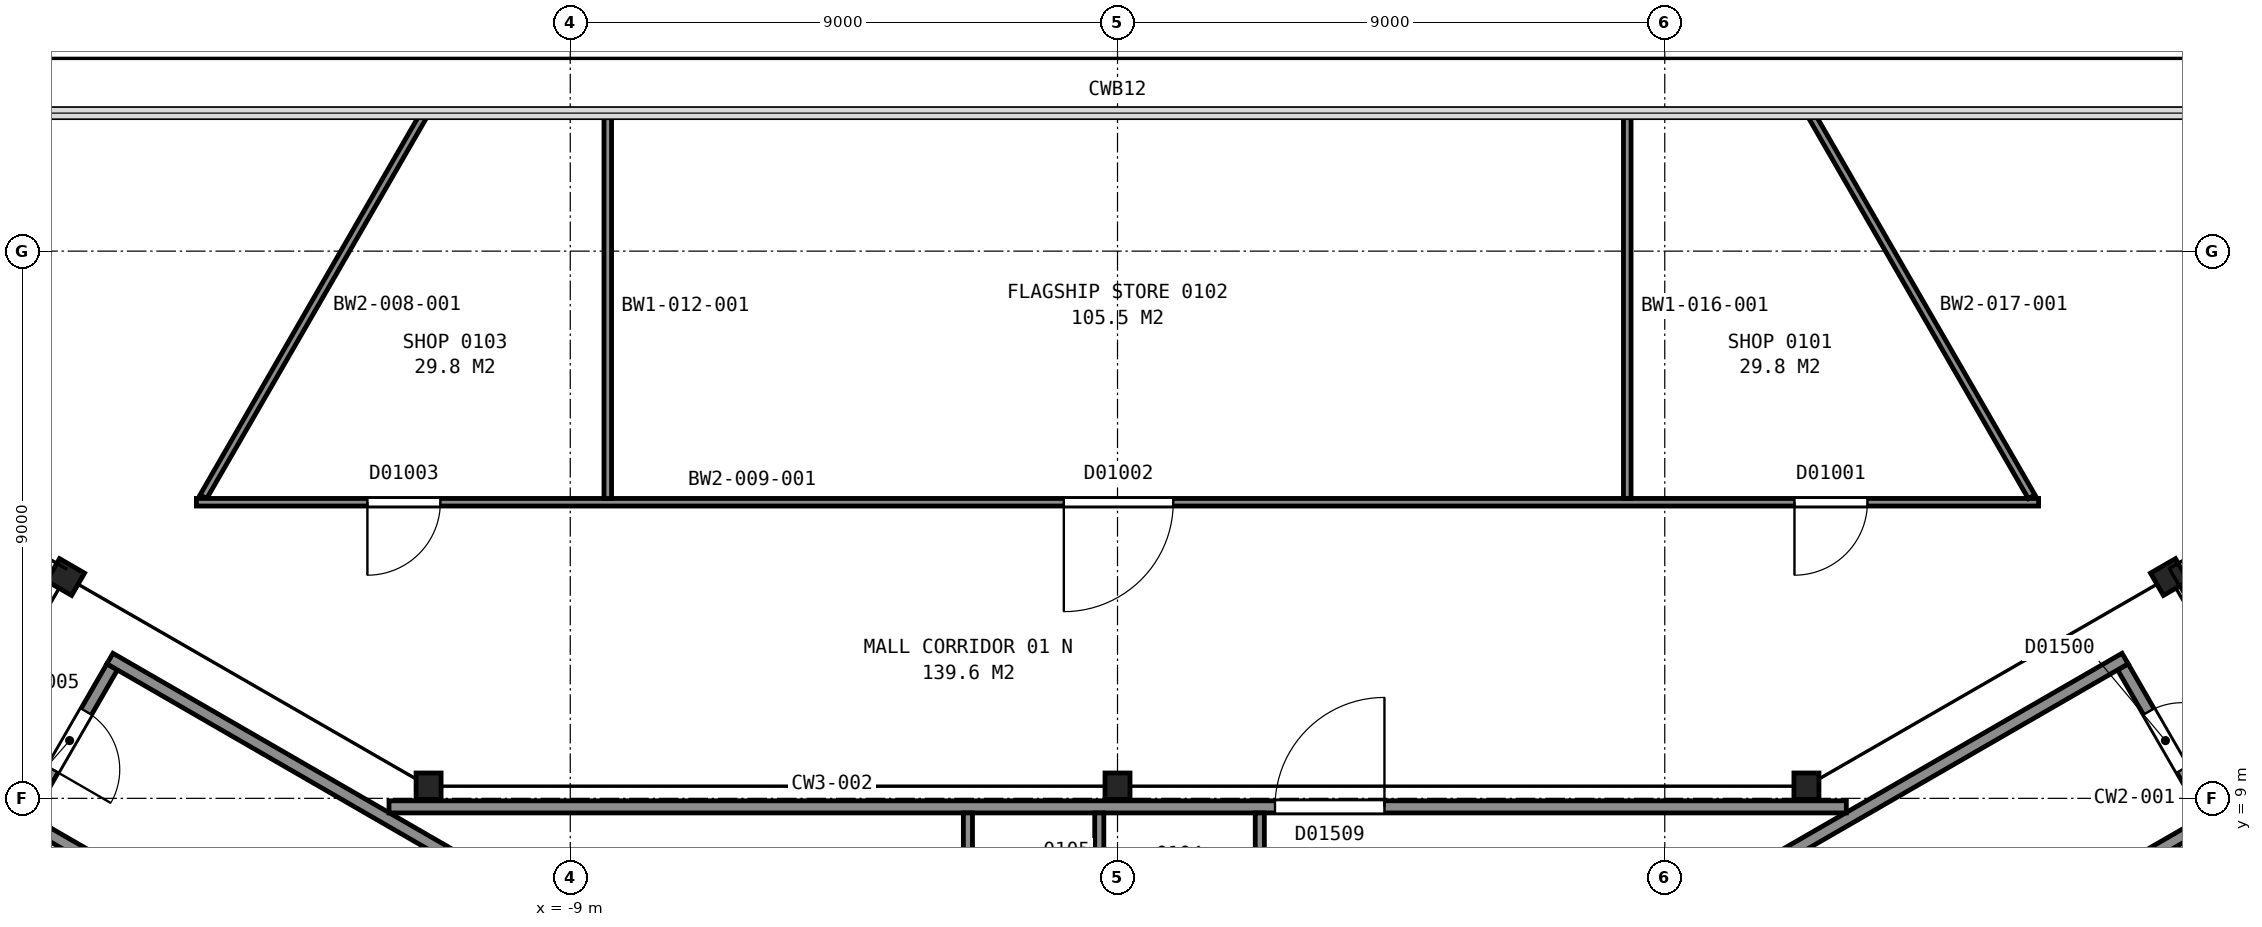
"""IFC4 building model, lengths in metres.
Left out: names, types, materials, properties, quantities, classifications, styles, units other than length and angle.
Written with IfcOpenShell. Run it as: python <this file> out.ifc"""

import sys

from ifc_helpers import new_model, si_unit, direction, frame, frame_2d, origin, origin_2d, place, context, subcontext, project, spatial, rectangle, i_section, extrude, element, fill, save


model = new_model("IFC4")
c1 = context("Model", 3, precision=1e-05, world=origin(), true_north=direction((0.0, 1.0)))
c2 = subcontext(c1, "Body", "Model", "MODEL_VIEW")
j1 = project(units=[si_unit("LENGTHUNIT", "METRE"), si_unit("PLANEANGLEUNIT", "RADIAN")], contexts=[c1])
p1 = place(None, origin())
s1 = spatial("IfcSite", under=j1, at=p1, CompositionType="ELEMENT")
p2 = place(p1, origin())
s2 = spatial("IfcBuilding", under=s1, at=p2, CompositionType="ELEMENT")
p3 = place(p2, frame((0.0, 0.0, 12.0)))
s3 = spatial("IfcBuildingStorey", under=s2, at=p3, CompositionType="ELEMENT", Elevation=12.0)
p4 = place(p3, frame((17.3, 12.64, 0.0), z_axis=(0.0, 0.0, 1.0), x_axis=(0.5, -0.866025403784, 0.0)))
e1 = element("IfcColumn", 1, at=p4, inside=s3, PredefinedType="COLUMN", context=c2, shape_type="SweptSolid", body=[
    extrude(i_section(OverallWidth=0.424, OverallDepth=0.475, WebThickness=0.048, FlangeThickness=0.077, FilletRadius=0.015, at=origin_2d()), origin(), (0.0, 0.0, 1.0), 5.4),
])
for number, where, z_axis, x_axis in (
    (2, (11.33, 9.2, 0.0), (0.0, 0.0, 1.0), (1.0, 0.0, 0.0)),
    (3, (0.0, 9.2, 0.0), (0.0, 0.0, 1.0), (1.0, 0.0, 0.0)),
    (4, (-11.33, 9.2, 0.0), (0.0, 0.0, 1.0), (1.0, 0.0, 0.0)),
):
    element("IfcColumn", number, at=place(p3, frame(where, z_axis=z_axis, x_axis=x_axis)), inside=s3, PredefinedType="COLUMN", context=c2, shape_type="SweptSolid", body=[
        extrude(i_section(OverallWidth=0.411, OverallDepth=0.434, WebThickness=0.036, FlangeThickness=0.057, FilletRadius=0.015, at=origin_2d()), origin(), (0.0, 0.0, 1.0), 5.4),
    ])
p5 = place(p3, frame((-17.3, 12.64, 0.0), z_axis=(0.0, 0.0, 1.0), x_axis=(0.5, 0.866025403784, 0.0)))
e5 = element("IfcColumn", 5, at=p5, inside=s3, PredefinedType="COLUMN", context=c2, shape_type="SweptSolid", body=[
    extrude(i_section(OverallWidth=0.424, OverallDepth=0.475, WebThickness=0.048, FlangeThickness=0.077, FilletRadius=0.015, at=origin_2d()), origin(), (0.0, 0.0, 1.0), 5.4),
])
p6 = place(p3, frame((17.934, 8.738, 0.0), z_axis=(0.0, 0.0, 1.0), x_axis=(-0.49998411664, 0.866034573852, 0.0)))
e6 = element("IfcWall", 6, at=p6, inside=s3, PredefinedType="PARTITIONING", context=c2, shape_type="SweptSolid", body=[
    extrude(rectangle(XDim=2.8, YDim=0.2, at=frame_2d((1.4, 0.0))), origin(), (0.0, 0.0, 1.0), 5.15),
])
p7 = place(p6, frame((0.85, 0.0, 0.0)))
e7 = element("IfcOpeningElement", 7, at=p7, cuts=e6, PredefinedType="OPENING", context=c2, shape_type="SweptSolid", body=[
    extrude(rectangle(XDim=1.1, YDim=2.1, at=frame_2d((0.55, 1.05))), frame((0.0, 0.11, 0.0), z_axis=(0.0, -1.0, 0.0), x_axis=(1.0, 0.0, 0.0)), (0.0, 0.0, 1.0), 0.22),
])
for number, where, z_axis, x_axis in (
    (8, (6.178, 5.299, 0.0), (0.0, 0.0, 1.0), (0.866, 0.5, 0.0)),
    (9, (7.678, 2.701, 0.0), (0.0, 0.0, 1.0), (0.866, 0.5, 0.0)),
):
    element("IfcWall", number, at=place(p3, frame(where, z_axis=z_axis, x_axis=x_axis)), inside=s3, PredefinedType="PARTITIONING", context=c2, shape_type="SweptSolid", body=[
        extrude(rectangle(XDim=12.0, YDim=0.2, at=frame_2d((6.0, 0.0))), origin(), (0.0, 0.0, 1.0), 5.15),
    ])
p8 = place(p3, frame((-16.534, 11.162, 0.0), z_axis=(0.0, 0.0, 1.0), x_axis=(-0.49998411664, -0.866034573852, 0.0)))
e10 = element("IfcWall", 10, at=p8, inside=s3, PredefinedType="PARTITIONING", context=c2, shape_type="SweptSolid", body=[
    extrude(rectangle(XDim=2.8, YDim=0.2, at=frame_2d((1.4, 0.0))), origin(), (0.0, 0.0, 1.0), 5.15),
])
p9 = place(p8, frame((0.85, 0.0, 0.0)))
e11 = element("IfcOpeningElement", 11, at=p9, cuts=e10, PredefinedType="OPENING", context=c2, shape_type="SweptSolid", body=[
    extrude(rectangle(XDim=1.1, YDim=2.1, at=frame_2d((0.55, 1.05))), frame((0.0, 0.11, 0.0), z_axis=(0.0, -1.0, 0.0), x_axis=(1.0, 0.0, 0.0)), (0.0, 0.0, 1.0), 0.22),
])
for number, where, z_axis, x_axis in (
    (12, (-7.678, 2.701, 0.0), (0.0, 0.0, 1.0), (-0.866, 0.5, 0.0)),
    (13, (-6.178, 5.299, 0.0), (0.0, 0.0, 1.0), (-0.866, 0.5, 0.0)),
):
    element("IfcWall", number, at=place(p3, frame(where, z_axis=z_axis, x_axis=x_axis)), inside=s3, PredefinedType="PARTITIONING", context=c2, shape_type="SweptSolid", body=[
        extrude(rectangle(XDim=12.0, YDim=0.2, at=frame_2d((6.0, 0.0))), origin(), (0.0, 0.0, 1.0), 5.15),
    ])
p10 = place(p3, frame((11.986, 8.86, 0.0), z_axis=(0.0, 0.0, 1.0), x_axis=(-1.0, 0.0, 0.0)))
e14 = element("IfcWall", 14, at=p10, inside=s3, PredefinedType="PARTITIONING", context=c2, shape_type="SweptSolid", body=[
    extrude(rectangle(XDim=23.967, YDim=0.2, at=frame_2d((11.983, 0.0))), origin(), (0.0, 0.0, 1.0), 5.15),
])
p11 = place(p10, frame((7.596, 0.0, 0.0)))
e15 = element("IfcOpeningElement", 15, at=p11, cuts=e14, PredefinedType="OPENING", context=c2, shape_type="SweptSolid", body=[
    extrude(rectangle(XDim=1.8, YDim=2.1, at=frame_2d((0.9, 1.05))), frame((0.0, 0.11, 0.0), z_axis=(0.0, -1.0, 0.0), x_axis=(1.0, 0.0, 0.0)), (0.0, 0.0, 1.0), 0.22),
])
p12 = place(p3, frame((-2.46, 8.76, 0.0), z_axis=(0.0, 0.0, 1.0), x_axis=(0.0, -1.0, 0.0)))
e16 = element("IfcWall", 16, at=p12, inside=s3, PredefinedType="PARTITIONING", context=c2, shape_type="SweptSolid", body=[
    extrude(rectangle(XDim=2.125, YDim=0.15, at=frame_2d((1.062, 0.0))), origin(), (0.0, 0.0, 1.0), 5.15),
])
p13 = place(p12, frame((0.6, 0.0, 0.0)))
e17 = element("IfcOpeningElement", 17, at=p13, cuts=e16, PredefinedType="OPENING", context=c2, shape_type="SweptSolid", body=[
    extrude(rectangle(XDim=0.9, YDim=2.1, at=frame_2d((0.45, 1.05))), frame((0.0, 0.085, 0.0), z_axis=(0.0, -1.0, 0.0), x_axis=(1.0, 0.0, 0.0)), (0.0, 0.0, 1.0), 0.17),
])
for number, where, z_axis, x_axis in (
    (18, (-0.3, 6.635, 0.0), (0.0, 0.0, 1.0), (0.0, 1.0, 0.0)),
    (19, (2.34, 6.635, 0.0), (0.0, 0.0, 1.0), (0.0, 1.0, 0.0)),
):
    element("IfcWall", number, at=place(p3, frame(where, z_axis=z_axis, x_axis=x_axis)), inside=s3, PredefinedType="PARTITIONING", context=c2, shape_type="SweptSolid", body=[
        extrude(rectangle(XDim=2.125, YDim=0.15, at=frame_2d((1.062, 0.0))), origin(), (0.0, 0.0, 1.0), 5.15),
    ])
p14 = place(p3, frame((-15.033, 13.961, 0.0), z_axis=(0.0, 0.0, 1.0), x_axis=(0.499977739203, 0.86603825568, 0.0)))
e20 = element("IfcWall", 20, at=p14, inside=s3, PredefinedType="PARTITIONING", context=c2, shape_type="SweptSolid", body=[
    extrude(rectangle(XDim=7.285, YDim=0.125, at=frame_2d((3.643, 0.0))), origin(), (0.0, 0.0, 1.0), 5.24),
])
p15 = place(p3, frame((-15.148, 13.87, 0.0), z_axis=(0.0, 0.0, 1.0), x_axis=(1.0, 0.0, 0.0)))
e21 = element("IfcWall", 21, at=p15, inside=s3, PredefinedType="PARTITIONING", context=c2, shape_type="SweptSolid", body=[
    extrude(rectangle(XDim=30.297, YDim=0.125, at=frame_2d((15.148, 0.0))), origin(), (0.0, 0.0, 1.0), 4.253),
])
p16 = place(p15, frame((26.281, 0.0, 0.0)))
e22 = element("IfcOpeningElement", 22, at=p16, cuts=e21, PredefinedType="OPENING", context=c2, shape_type="SweptSolid", body=[
    extrude(rectangle(XDim=1.2, YDim=2.1, at=frame_2d((0.6, 1.05))), frame((0.0, 0.073, 0.0), z_axis=(0.0, -1.0, 0.0), x_axis=(1.0, 0.0, 0.0)), (0.0, 0.0, 1.0), 0.145),
])
p17 = place(p15, frame((14.265, 0.0, 0.0)))
e23 = element("IfcOpeningElement", 23, at=p17, cuts=e21, PredefinedType="OPENING", context=c2, shape_type="SweptSolid", body=[
    extrude(rectangle(XDim=1.8, YDim=2.4, at=frame_2d((0.9, 1.2))), frame((0.0, 0.073, 0.0), z_axis=(0.0, -1.0, 0.0), x_axis=(1.0, 0.0, 0.0)), (0.0, 0.0, 1.0), 0.145),
])
p18 = place(p15, frame((2.812, 0.0, 0.0)))
e24 = element("IfcOpeningElement", 24, at=p18, cuts=e21, PredefinedType="OPENING", context=c2, shape_type="SweptSolid", body=[
    extrude(rectangle(XDim=1.2, YDim=2.1, at=frame_2d((0.6, 1.05))), frame((0.0, 0.073, 0.0), z_axis=(0.0, -1.0, 0.0), x_axis=(1.0, 0.0, 0.0)), (0.0, 0.0, 1.0), 0.145),
])
for number, where, z_axis, x_axis in (
    (25, (-8.383, 13.933, 0.0), (0.0, 0.0, 1.0), (0.0, 1.0, 0.0)),
    (26, (8.383, 13.933, 0.0), (0.0, 0.0, 1.0), (0.0, 1.0, 0.0)),
):
    element("IfcWall", number, at=place(p3, frame(where, z_axis=z_axis, x_axis=x_axis)), inside=s3, PredefinedType="PARTITIONING", context=c2, shape_type="SweptSolid", body=[
        extrude(rectangle(XDim=6.337, YDim=0.125, at=frame_2d((3.169, 0.0))), origin(), (0.0, 0.0, 1.0), 4.253),
    ])
p19 = place(p3, frame((11.391, 20.27, 0.0), z_axis=(0.0, 0.0, 1.0), x_axis=(0.499977739203, -0.86603825568, 0.0)))
e27 = element("IfcWall", 27, at=p19, inside=s3, PredefinedType="PARTITIONING", context=c2, shape_type="SweptSolid", body=[
    extrude(rectangle(XDim=7.285, YDim=0.125, at=frame_2d((3.643, 0.0))), origin(), (0.0, 0.0, 1.0), 5.24),
])
p20 = place(p7, origin())
e28 = element("IfcDoor", 28, at=p20, inside=s3, OperationType="SINGLE_SWING_LEFT", PredefinedType="DOOR", context=c2, shape_type="SweptSolid", body=[
    extrude(rectangle(XDim=1.1, YDim=2.1, at=frame_2d((0.55, 1.05))), frame((0.0, 0.025, 0.0), z_axis=(0.0, -1.0, 0.0), x_axis=(1.0, 0.0, 0.0)), (0.0, 0.0, 1.0), 0.05),
])
fill(e7, e28)
p21 = place(p9, origin())
e29 = element("IfcDoor", 29, at=p21, inside=s3, OperationType="SINGLE_SWING_RIGHT", PredefinedType="DOOR", context=c2, shape_type="SweptSolid", body=[
    extrude(rectangle(XDim=1.1, YDim=2.1, at=frame_2d((0.55, 1.05))), frame((0.0, 0.025, 0.0), z_axis=(0.0, -1.0, 0.0), x_axis=(1.0, 0.0, 0.0)), (0.0, 0.0, 1.0), 0.05),
])
fill(e11, e29)
p22 = place(p11, origin())
e30 = element("IfcDoor", 30, at=p22, inside=s3, OperationType="DOUBLE_DOOR_SINGLE_SWING", PredefinedType="DOOR", context=c2, shape_type="SweptSolid", body=[
    extrude(rectangle(XDim=1.8, YDim=2.1, at=frame_2d((0.9, 1.05))), frame((0.0, 0.025, 0.0), z_axis=(0.0, -1.0, 0.0), x_axis=(1.0, 0.0, 0.0)), (0.0, 0.0, 1.0), 0.05),
])
fill(e15, e30)
p23 = place(p16, origin())
e31 = element("IfcDoor", 31, at=p23, inside=s3, OperationType="SINGLE_SWING_LEFT", PredefinedType="DOOR", context=c2, shape_type="SweptSolid", body=[
    extrude(rectangle(XDim=1.2, YDim=2.1, at=frame_2d((0.6, 1.05))), frame((0.0, 0.025, 0.0), z_axis=(0.0, -1.0, 0.0), x_axis=(1.0, 0.0, 0.0)), (0.0, 0.0, 1.0), 0.05),
])
fill(e22, e31)
p24 = place(p17, origin())
e32 = element("IfcDoor", 32, at=p24, inside=s3, OperationType="DOUBLE_DOOR_SINGLE_SWING", PredefinedType="DOOR", context=c2, shape_type="SweptSolid", body=[
    extrude(rectangle(XDim=1.8, YDim=2.4, at=frame_2d((0.9, 1.2))), frame((0.0, 0.025, 0.0), z_axis=(0.0, -1.0, 0.0), x_axis=(1.0, 0.0, 0.0)), (0.0, 0.0, 1.0), 0.05),
])
fill(e23, e32)
p25 = place(p18, origin())
e33 = element("IfcDoor", 33, at=p25, inside=s3, OperationType="SINGLE_SWING_LEFT", PredefinedType="DOOR", context=c2, shape_type="SweptSolid", body=[
    extrude(rectangle(XDim=1.2, YDim=2.1, at=frame_2d((0.6, 1.05))), frame((0.0, 0.025, 0.0), z_axis=(0.0, -1.0, 0.0), x_axis=(1.0, 0.0, 0.0)), (0.0, 0.0, 1.0), 0.05),
])
fill(e24, e33)
save(model, sys.argv[1])
